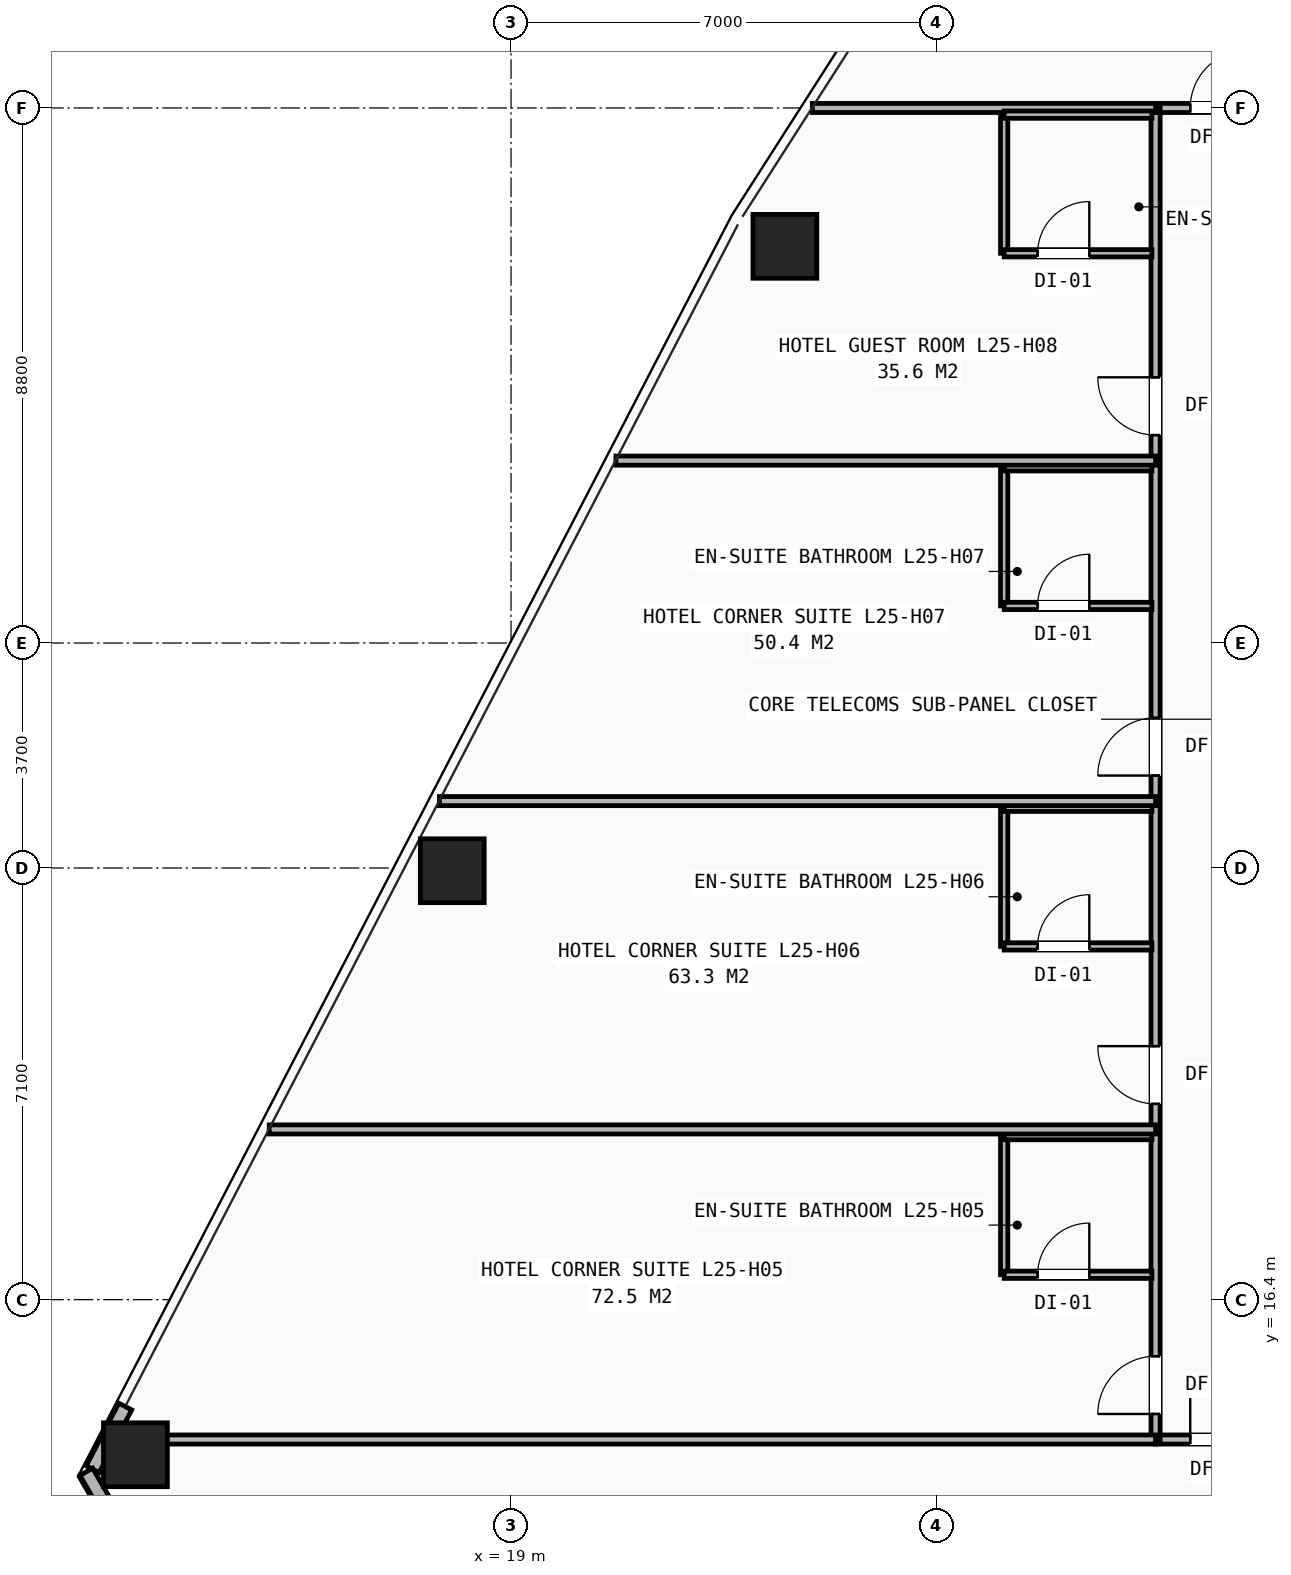
"""IFC4 building model, lengths in metres.
Left out: names, types, materials, properties, quantities, classifications, styles, units other than length and angle.
Written with IfcOpenShell. Run it as: python <this file> out.ifc"""

import sys

from ifc_helpers import new_model, si_unit, direction, frame, frame_2d, origin, origin_2d, place, context, subcontext, project, spatial, rectangle, hollow_rectangle, extrude, element, fill, save


model = new_model("IFC4")
c1 = context("Model", 3, precision=1e-05, world=origin(), true_north=direction((0.0, 1.0)))
c2 = subcontext(c1, "Body", "Model", "MODEL_VIEW")
j1 = project(units=[si_unit("LENGTHUNIT", "METRE"), si_unit("PLANEANGLEUNIT", "RADIAN")], contexts=[c1])
p1 = place(None, origin())
s1 = spatial("IfcSite", under=j1, at=p1, CompositionType="ELEMENT")
p2 = place(p1, origin())
s2 = spatial("IfcBuilding", under=s1, at=p2, CompositionType="ELEMENT")
p3 = place(p2, frame((0.0, 0.0, 89.4)))
s3 = spatial("IfcBuildingStorey", under=s2, at=p3, CompositionType="ELEMENT", Elevation=89.4)
for number, where, z_axis, x_axis in (
    (1, (23.504, 33.724, 0.0), (0.0, 0.0, 1.0), (1.0, 0.0, 0.0)),
    (2, (18.033, 23.455, 0.0), (0.0, 0.0, 1.0), (1.0, 0.0, 0.0)),
    (3, (12.823, 13.849, 0.0), (0.0, 0.0, 1.0), (1.0, 0.0, 0.0)),
):
    element("IfcColumn", number, at=place(p3, frame(where, z_axis=z_axis, x_axis=x_axis)), inside=s3, PredefinedType="COLUMN", context=c2, shape_type="SweptSolid", body=[
        extrude(hollow_rectangle(XDim=1.05, YDim=1.05, WallThickness=0.07, at=origin_2d()), origin(), (0.0, 0.0, 1.0), 3.2),
    ])
p4 = place(p3, frame((12.655, 14.643, 0.0), z_axis=(0.0, 0.0, 1.0), x_axis=(-0.460022833548, -0.887907085575, 0.0)))
e4 = element("IfcWall", 4, at=p4, inside=s3, PredefinedType="SHEAR", context=c2, shape_type="SweptSolid", body=[
    extrude(rectangle(XDim=1.162, YDim=0.24, at=frame_2d((0.581, 0.0))), origin(), (0.0, 0.0, 1.0), 2.253),
])
p5 = place(p3, frame((16.801, 5.28, 0.0), z_axis=(0.0, 0.0, 1.0), x_axis=(-0.499996243911, 0.866027572353, 0.0)))
e5 = element("IfcWall", 5, at=p5, inside=s3, PredefinedType="SHEAR", context=c2, shape_type="SweptSolid", body=[
    extrude(rectangle(XDim=9.571, YDim=0.24, at=frame_2d((4.786, 0.0))), origin(), (0.0, 0.0, 1.0), 2.253),
])
p6 = place(p3, frame((29.6, 14.1, 0.0), z_axis=(0.0, 0.0, 1.0), x_axis=(1.0, 0.0, 0.0)))
e6 = element("IfcWall", 6, at=p6, inside=s3, PredefinedType="PARTITIONING", context=c2, shape_type="SweptSolid", body=[
    extrude(rectangle(XDim=20.8, YDim=0.15, at=frame_2d((10.4, 0.0))), origin(), (0.0, 0.0, 1.0), 2.181),
])
p7 = place(p6, frame((0.57, 0.0, 0.0)))
e7 = element("IfcOpeningElement", 7, at=p7, cuts=e6, PredefinedType="OPENING", context=c2, shape_type="SweptSolid", body=[
    extrude(rectangle(XDim=0.95, YDim=2.1, at=frame_2d((0.475, 1.05))), frame((0.0, 0.085, 0.0), z_axis=(0.0, -1.0, 0.0), x_axis=(1.0, 0.0, 0.0)), (0.0, 0.0, 1.0), 0.17),
])
p8 = place(p6, frame((5.02, 0.0, 0.0)))
e8 = element("IfcOpeningElement", 8, at=p8, cuts=e6, PredefinedType="OPENING", context=c2, shape_type="SweptSolid", body=[
    extrude(rectangle(XDim=0.95, YDim=2.1, at=frame_2d((0.475, 1.05))), frame((0.0, 0.085, 0.0), z_axis=(0.0, -1.0, 0.0), x_axis=(1.0, 0.0, 0.0)), (0.0, 0.0, 1.0), 0.17),
])
p9 = place(p6, frame((10.62, 0.0, 0.0)))
e9 = element("IfcOpeningElement", 9, at=p9, cuts=e6, PredefinedType="OPENING", context=c2, shape_type="SweptSolid", body=[
    extrude(rectangle(XDim=0.95, YDim=2.1, at=frame_2d((0.475, 1.05))), frame((0.0, 0.085, 0.0), z_axis=(0.0, -1.0, 0.0), x_axis=(1.0, 0.0, 0.0)), (0.0, 0.0, 1.0), 0.17),
])
p10 = place(p6, frame((16.42, 0.0, 0.0)))
e10 = element("IfcOpeningElement", 10, at=p10, cuts=e6, PredefinedType="OPENING", context=c2, shape_type="SweptSolid", body=[
    extrude(rectangle(XDim=0.95, YDim=2.1, at=frame_2d((0.475, 1.05))), frame((0.0, 0.085, 0.0), z_axis=(0.0, -1.0, 0.0), x_axis=(1.0, 0.0, 0.0)), (0.0, 0.0, 1.0), 0.17),
])
p11 = place(p3, frame((29.6, 36.0, 0.0), z_axis=(0.0, 0.0, 1.0), x_axis=(1.0, 0.0, 0.0)))
e11 = element("IfcWall", 11, at=p11, inside=s3, PredefinedType="PARTITIONING", context=c2, shape_type="SweptSolid", body=[
    extrude(rectangle(XDim=9.65, YDim=0.15, at=frame_2d((4.825, 0.0))), origin(), (0.0, 0.0, 1.0), 2.503),
])
p12 = place(p11, frame((0.57, 0.0, 0.0)))
e12 = element("IfcOpeningElement", 12, at=p12, cuts=e11, PredefinedType="OPENING", context=c2, shape_type="SweptSolid", body=[
    extrude(rectangle(XDim=0.95, YDim=2.1, at=frame_2d((0.475, 1.05))), frame((0.0, 0.085, 0.0), z_axis=(0.0, -1.0, 0.0), x_axis=(1.0, 0.0, 0.0)), (0.0, 0.0, 1.0), 0.17),
])
p13 = place(p11, frame((7.62, 0.0, 0.0)))
e13 = element("IfcOpeningElement", 13, at=p13, cuts=e11, PredefinedType="OPENING", context=c2, shape_type="SweptSolid", body=[
    extrude(rectangle(XDim=0.95, YDim=2.1, at=frame_2d((0.475, 1.05))), frame((0.0, 0.085, 0.0), z_axis=(0.0, -1.0, 0.0), x_axis=(1.0, 0.0, 0.0)), (0.0, 0.0, 1.0), 0.17),
])
p14 = place(p3, frame((29.6, 14.1, 0.0), z_axis=(0.0, 0.0, 1.0), x_axis=(0.0, 1.0, 0.0)))
e14 = element("IfcWall", 14, at=p14, inside=s3, PredefinedType="PARTITIONING", context=c2, shape_type="SweptSolid", body=[
    extrude(rectangle(XDim=21.9, YDim=0.15, at=frame_2d((10.95, 0.0))), origin(), (0.0, 0.0, 1.0), 2.181),
])
p15 = place(p14, frame((0.42, 0.0, 0.0)))
e15 = element("IfcOpeningElement", 15, at=p15, cuts=e14, PredefinedType="OPENING", context=c2, shape_type="SweptSolid", body=[
    extrude(rectangle(XDim=0.95, YDim=2.1, at=frame_2d((0.475, 1.05))), frame((0.0, 0.085, 0.0), z_axis=(0.0, -1.0, 0.0), x_axis=(1.0, 0.0, 0.0)), (0.0, 0.0, 1.0), 0.17),
])
p16 = place(p14, frame((5.52, 0.0, 0.0)))
e16 = element("IfcOpeningElement", 16, at=p16, cuts=e14, PredefinedType="OPENING", context=c2, shape_type="SweptSolid", body=[
    extrude(rectangle(XDim=0.95, YDim=2.1, at=frame_2d((0.475, 1.05))), frame((0.0, 0.085, 0.0), z_axis=(0.0, -1.0, 0.0), x_axis=(1.0, 0.0, 0.0)), (0.0, 0.0, 1.0), 0.17),
])
p17 = place(p14, frame((10.92, 0.0, 0.0)))
e17 = element("IfcOpeningElement", 17, at=p17, cuts=e14, PredefinedType="OPENING", context=c2, shape_type="SweptSolid", body=[
    extrude(rectangle(XDim=0.95, YDim=2.1, at=frame_2d((0.475, 1.05))), frame((0.0, 0.085, 0.0), z_axis=(0.0, -1.0, 0.0), x_axis=(1.0, 0.0, 0.0)), (0.0, 0.0, 1.0), 0.17),
])
p18 = place(p14, frame((16.52, 0.0, 0.0)))
e18 = element("IfcOpeningElement", 18, at=p18, cuts=e14, PredefinedType="OPENING", context=c2, shape_type="SweptSolid", body=[
    extrude(rectangle(XDim=0.95, YDim=2.1, at=frame_2d((0.475, 1.05))), frame((0.0, 0.085, 0.0), z_axis=(0.0, -1.0, 0.0), x_axis=(1.0, 0.0, 0.0)), (0.0, 0.0, 1.0), 0.17),
])
p19 = place(p3, frame((12.379, 14.1, 0.0), z_axis=(0.0, 0.0, 1.0), x_axis=(1.0, 0.0, 0.0)))
e19 = element("IfcWall", 19, at=p19, inside=s3, PredefinedType="PARTITIONING", context=c2, shape_type="SweptSolid", body=[
    extrude(rectangle(XDim=17.221, YDim=0.15, at=frame_2d((8.61, 0.0))), origin(), (0.0, 0.0, 1.0), 2.181),
])
p20 = place(p3, frame((23.955, 36.0, 0.0), z_axis=(0.0, 0.0, 1.0), x_axis=(1.0, 0.0, 0.0)))
e20 = element("IfcWall", 20, at=p20, inside=s3, PredefinedType="PARTITIONING", context=c2, shape_type="SweptSolid", body=[
    extrude(rectangle(XDim=5.645, YDim=0.15, at=frame_2d((2.823, 0.0))), origin(), (0.0, 0.0, 1.0), 2.258),
])
p21 = place(p3, frame((27.11, 16.81, 0.0), z_axis=(0.0, 0.0, 1.0), x_axis=(0.0, 1.0, 0.0)))
e21 = element("IfcWall", 21, at=p21, inside=s3, PredefinedType="PARTITIONING", context=c2, shape_type="SweptSolid", body=[
    extrude(rectangle(XDim=2.28, YDim=0.12, at=frame_2d((1.14, 0.0))), origin(), (0.0, 0.0, 1.0), 2.97),
])
p22 = place(p3, frame((27.11, 16.81, 0.0), z_axis=(0.0, 0.0, 1.0), x_axis=(1.0, 0.0, 0.0)))
e22 = element("IfcWall", 22, at=p22, inside=s3, PredefinedType="PARTITIONING", context=c2, shape_type="SweptSolid", body=[
    extrude(rectangle(XDim=2.43, YDim=0.12, at=frame_2d((1.215, 0.0))), origin(), (0.0, 0.0, 1.0), 2.97),
])
p23 = place(p22, frame((0.55, 0.0, 0.0)))
e23 = element("IfcOpeningElement", 23, at=p23, cuts=e22, PredefinedType="OPENING", context=c2, shape_type="SweptSolid", body=[
    extrude(rectangle(XDim=0.85, YDim=2.05, at=frame_2d((0.425, 1.025))), frame((0.0, 0.07, 0.0), z_axis=(0.0, -1.0, 0.0), x_axis=(1.0, 0.0, 0.0)), (0.0, 0.0, 1.0), 0.14),
])
p24 = place(p3, frame((27.11, 19.09, 0.0), z_axis=(0.0, 0.0, 1.0), x_axis=(1.0, 0.0, 0.0)))
e24 = element("IfcWall", 24, at=p24, inside=s3, PredefinedType="PARTITIONING", context=c2, shape_type="SweptSolid", body=[
    extrude(rectangle(XDim=2.43, YDim=0.12, at=frame_2d((1.215, 0.0))), origin(), (0.0, 0.0, 1.0), 2.97),
])
p25 = place(p3, frame((15.023, 19.2, 0.0), z_axis=(0.0, 0.0, 1.0), x_axis=(1.0, 0.0, 0.0)))
e25 = element("IfcWall", 25, at=p25, inside=s3, PredefinedType="PARTITIONING", context=c2, shape_type="SweptSolid", body=[
    extrude(rectangle(XDim=14.577, YDim=0.15, at=frame_2d((7.289, 0.0))), origin(), (0.0, 0.0, 1.0), 2.258),
])
p26 = place(p3, frame((27.11, 22.21, 0.0), z_axis=(0.0, 0.0, 1.0), x_axis=(0.0, 1.0, 0.0)))
e26 = element("IfcWall", 26, at=p26, inside=s3, PredefinedType="PARTITIONING", context=c2, shape_type="SweptSolid", body=[
    extrude(rectangle(XDim=2.28, YDim=0.12, at=frame_2d((1.14, 0.0))), origin(), (0.0, 0.0, 1.0), 2.97),
])
p27 = place(p3, frame((27.11, 22.21, 0.0), z_axis=(0.0, 0.0, 1.0), x_axis=(1.0, 0.0, 0.0)))
e27 = element("IfcWall", 27, at=p27, inside=s3, PredefinedType="PARTITIONING", context=c2, shape_type="SweptSolid", body=[
    extrude(rectangle(XDim=2.43, YDim=0.12, at=frame_2d((1.215, 0.0))), origin(), (0.0, 0.0, 1.0), 2.97),
])
p28 = place(p27, frame((0.55, 0.0, 0.0)))
e28 = element("IfcOpeningElement", 28, at=p28, cuts=e27, PredefinedType="OPENING", context=c2, shape_type="SweptSolid", body=[
    extrude(rectangle(XDim=0.85, YDim=2.05, at=frame_2d((0.425, 1.025))), frame((0.0, 0.07, 0.0), z_axis=(0.0, -1.0, 0.0), x_axis=(1.0, 0.0, 0.0)), (0.0, 0.0, 1.0), 0.14),
])
p29 = place(p3, frame((27.11, 24.49, 0.0), z_axis=(0.0, 0.0, 1.0), x_axis=(1.0, 0.0, 0.0)))
e29 = element("IfcWall", 29, at=p29, inside=s3, PredefinedType="PARTITIONING", context=c2, shape_type="SweptSolid", body=[
    extrude(rectangle(XDim=2.43, YDim=0.12, at=frame_2d((1.215, 0.0))), origin(), (0.0, 0.0, 1.0), 2.97),
])
p30 = place(p3, frame((17.822, 24.6, 0.0), z_axis=(0.0, 0.0, 1.0), x_axis=(1.0, 0.0, 0.0)))
e30 = element("IfcWall", 30, at=p30, inside=s3, PredefinedType="PARTITIONING", context=c2, shape_type="SweptSolid", body=[
    extrude(rectangle(XDim=11.778, YDim=0.15, at=frame_2d((5.889, 0.0))), origin(), (0.0, 0.0, 1.0), 2.258),
])
p31 = place(p3, frame((27.11, 27.81, 0.0), z_axis=(0.0, 0.0, 1.0), x_axis=(0.0, 1.0, 0.0)))
e31 = element("IfcWall", 31, at=p31, inside=s3, PredefinedType="PARTITIONING", context=c2, shape_type="SweptSolid", body=[
    extrude(rectangle(XDim=2.28, YDim=0.12, at=frame_2d((1.14, 0.0))), origin(), (0.0, 0.0, 1.0), 2.97),
])
p32 = place(p3, frame((27.11, 27.81, 0.0), z_axis=(0.0, 0.0, 1.0), x_axis=(1.0, 0.0, 0.0)))
e32 = element("IfcWall", 32, at=p32, inside=s3, PredefinedType="PARTITIONING", context=c2, shape_type="SweptSolid", body=[
    extrude(rectangle(XDim=2.43, YDim=0.12, at=frame_2d((1.215, 0.0))), origin(), (0.0, 0.0, 1.0), 2.97),
])
p33 = place(p32, frame((0.55, 0.0, 0.0)))
e33 = element("IfcOpeningElement", 33, at=p33, cuts=e32, PredefinedType="OPENING", context=c2, shape_type="SweptSolid", body=[
    extrude(rectangle(XDim=0.85, YDim=2.05, at=frame_2d((0.425, 1.025))), frame((0.0, 0.07, 0.0), z_axis=(0.0, -1.0, 0.0), x_axis=(1.0, 0.0, 0.0)), (0.0, 0.0, 1.0), 0.14),
])
p34 = place(p3, frame((27.11, 30.09, 0.0), z_axis=(0.0, 0.0, 1.0), x_axis=(1.0, 0.0, 0.0)))
e34 = element("IfcWall", 34, at=p34, inside=s3, PredefinedType="PARTITIONING", context=c2, shape_type="SweptSolid", body=[
    extrude(rectangle(XDim=2.43, YDim=0.12, at=frame_2d((1.215, 0.0))), origin(), (0.0, 0.0, 1.0), 2.97),
])
p35 = place(p3, frame((20.724, 30.2, 0.0), z_axis=(0.0, 0.0, 1.0), x_axis=(1.0, 0.0, 0.0)))
e35 = element("IfcWall", 35, at=p35, inside=s3, PredefinedType="PARTITIONING", context=c2, shape_type="SweptSolid", body=[
    extrude(rectangle(XDim=8.876, YDim=0.15, at=frame_2d((4.438, 0.0))), origin(), (0.0, 0.0, 1.0), 2.258),
])
p36 = place(p3, frame((27.11, 33.61, 0.0), z_axis=(0.0, 0.0, 1.0), x_axis=(0.0, 1.0, 0.0)))
e36 = element("IfcWall", 36, at=p36, inside=s3, PredefinedType="PARTITIONING", context=c2, shape_type="SweptSolid", body=[
    extrude(rectangle(XDim=2.28, YDim=0.12, at=frame_2d((1.14, 0.0))), origin(), (0.0, 0.0, 1.0), 2.97),
])
p37 = place(p3, frame((27.11, 33.61, 0.0), z_axis=(0.0, 0.0, 1.0), x_axis=(1.0, 0.0, 0.0)))
e37 = element("IfcWall", 37, at=p37, inside=s3, PredefinedType="PARTITIONING", context=c2, shape_type="SweptSolid", body=[
    extrude(rectangle(XDim=2.43, YDim=0.12, at=frame_2d((1.215, 0.0))), origin(), (0.0, 0.0, 1.0), 2.503),
])
p38 = place(p37, frame((0.55, 0.0, 0.0)))
e38 = element("IfcOpeningElement", 38, at=p38, cuts=e37, PredefinedType="OPENING", context=c2, shape_type="SweptSolid", body=[
    extrude(rectangle(XDim=0.85, YDim=2.05, at=frame_2d((0.425, 1.025))), frame((0.0, 0.07, 0.0), z_axis=(0.0, -1.0, 0.0), x_axis=(1.0, 0.0, 0.0)), (0.0, 0.0, 1.0), 0.14),
])
p39 = place(p3, frame((27.11, 35.89, 0.0), z_axis=(0.0, 0.0, 1.0), x_axis=(1.0, 0.0, 0.0)))
e39 = element("IfcWall", 39, at=p39, inside=s3, PredefinedType="PARTITIONING", context=c2, shape_type="SweptSolid", body=[
    extrude(rectangle(XDim=2.43, YDim=0.12, at=frame_2d((1.215, 0.0))), origin(), (0.0, 0.0, 1.0), 2.503),
])
p40 = place(p7, origin())
e40 = element("IfcDoor", 40, at=p40, inside=s3, OperationType="SINGLE_SWING_LEFT", PredefinedType="DOOR", context=c2, shape_type="SweptSolid", body=[
    extrude(rectangle(XDim=0.95, YDim=2.1, at=frame_2d((0.475, 1.05))), frame((0.0, 0.025, 0.0), z_axis=(0.0, -1.0, 0.0), x_axis=(1.0, 0.0, 0.0)), (0.0, 0.0, 1.0), 0.05),
])
fill(e7, e40)
p41 = place(p15, origin())
e41 = element("IfcDoor", 41, at=p41, inside=s3, OperationType="SINGLE_SWING_LEFT", PredefinedType="DOOR", context=c2, shape_type="SweptSolid", body=[
    extrude(rectangle(XDim=0.95, YDim=2.1, at=frame_2d((0.475, 1.05))), frame((0.0, 0.025, 0.0), z_axis=(0.0, -1.0, 0.0), x_axis=(1.0, 0.0, 0.0)), (0.0, 0.0, 1.0), 0.05),
])
fill(e15, e41)
p42 = place(p23, origin())
e42 = element("IfcDoor", 42, at=p42, inside=s3, OperationType="SINGLE_SWING_RIGHT", PredefinedType="DOOR", context=c2, shape_type="SweptSolid", body=[
    extrude(rectangle(XDim=0.85, YDim=2.05, at=frame_2d((0.425, 1.025))), frame((0.0, 0.025, 0.0), z_axis=(0.0, -1.0, 0.0), x_axis=(1.0, 0.0, 0.0)), (0.0, 0.0, 1.0), 0.05),
])
fill(e23, e42)
p43 = place(p16, origin())
e43 = element("IfcDoor", 43, at=p43, inside=s3, OperationType="SINGLE_SWING_RIGHT", PredefinedType="DOOR", context=c2, shape_type="SweptSolid", body=[
    extrude(rectangle(XDim=0.95, YDim=2.1, at=frame_2d((0.475, 1.05))), frame((0.0, 0.025, 0.0), z_axis=(0.0, -1.0, 0.0), x_axis=(1.0, 0.0, 0.0)), (0.0, 0.0, 1.0), 0.05),
])
fill(e16, e43)
p44 = place(p28, origin())
e44 = element("IfcDoor", 44, at=p44, inside=s3, OperationType="SINGLE_SWING_RIGHT", PredefinedType="DOOR", context=c2, shape_type="SweptSolid", body=[
    extrude(rectangle(XDim=0.85, YDim=2.05, at=frame_2d((0.425, 1.025))), frame((0.0, 0.025, 0.0), z_axis=(0.0, -1.0, 0.0), x_axis=(1.0, 0.0, 0.0)), (0.0, 0.0, 1.0), 0.05),
])
fill(e28, e44)
p45 = place(p17, origin())
e45 = element("IfcDoor", 45, at=p45, inside=s3, OperationType="SINGLE_SWING_LEFT", PredefinedType="DOOR", context=c2, shape_type="SweptSolid", body=[
    extrude(rectangle(XDim=0.95, YDim=2.1, at=frame_2d((0.475, 1.05))), frame((0.0, 0.025, 0.0), z_axis=(0.0, -1.0, 0.0), x_axis=(1.0, 0.0, 0.0)), (0.0, 0.0, 1.0), 0.05),
])
fill(e17, e45)
p46 = place(p33, origin())
e46 = element("IfcDoor", 46, at=p46, inside=s3, OperationType="SINGLE_SWING_RIGHT", PredefinedType="DOOR", context=c2, shape_type="SweptSolid", body=[
    extrude(rectangle(XDim=0.85, YDim=2.05, at=frame_2d((0.425, 1.025))), frame((0.0, 0.025, 0.0), z_axis=(0.0, -1.0, 0.0), x_axis=(1.0, 0.0, 0.0)), (0.0, 0.0, 1.0), 0.05),
])
fill(e33, e46)
p47 = place(p18, origin())
e47 = element("IfcDoor", 47, at=p47, inside=s3, OperationType="SINGLE_SWING_RIGHT", PredefinedType="DOOR", context=c2, shape_type="SweptSolid", body=[
    extrude(rectangle(XDim=0.95, YDim=2.1, at=frame_2d((0.475, 1.05))), frame((0.0, 0.025, 0.0), z_axis=(0.0, -1.0, 0.0), x_axis=(1.0, 0.0, 0.0)), (0.0, 0.0, 1.0), 0.05),
])
fill(e18, e47)
p48 = place(p38, origin())
e48 = element("IfcDoor", 48, at=p48, inside=s3, OperationType="SINGLE_SWING_RIGHT", PredefinedType="DOOR", context=c2, shape_type="SweptSolid", body=[
    extrude(rectangle(XDim=0.85, YDim=2.05, at=frame_2d((0.425, 1.025))), frame((0.0, 0.025, 0.0), z_axis=(0.0, -1.0, 0.0), x_axis=(1.0, 0.0, 0.0)), (0.0, 0.0, 1.0), 0.05),
])
fill(e38, e48)
p49 = place(p12, origin())
e49 = element("IfcDoor", 49, at=p49, inside=s3, OperationType="SINGLE_SWING_RIGHT", PredefinedType="DOOR", context=c2, shape_type="SweptSolid", body=[
    extrude(rectangle(XDim=0.95, YDim=2.1, at=frame_2d((0.475, 1.05))), frame((0.0, 0.025, 0.0), z_axis=(0.0, -1.0, 0.0), x_axis=(1.0, 0.0, 0.0)), (0.0, 0.0, 1.0), 0.05),
])
fill(e12, e49)
save(model, sys.argv[1])
